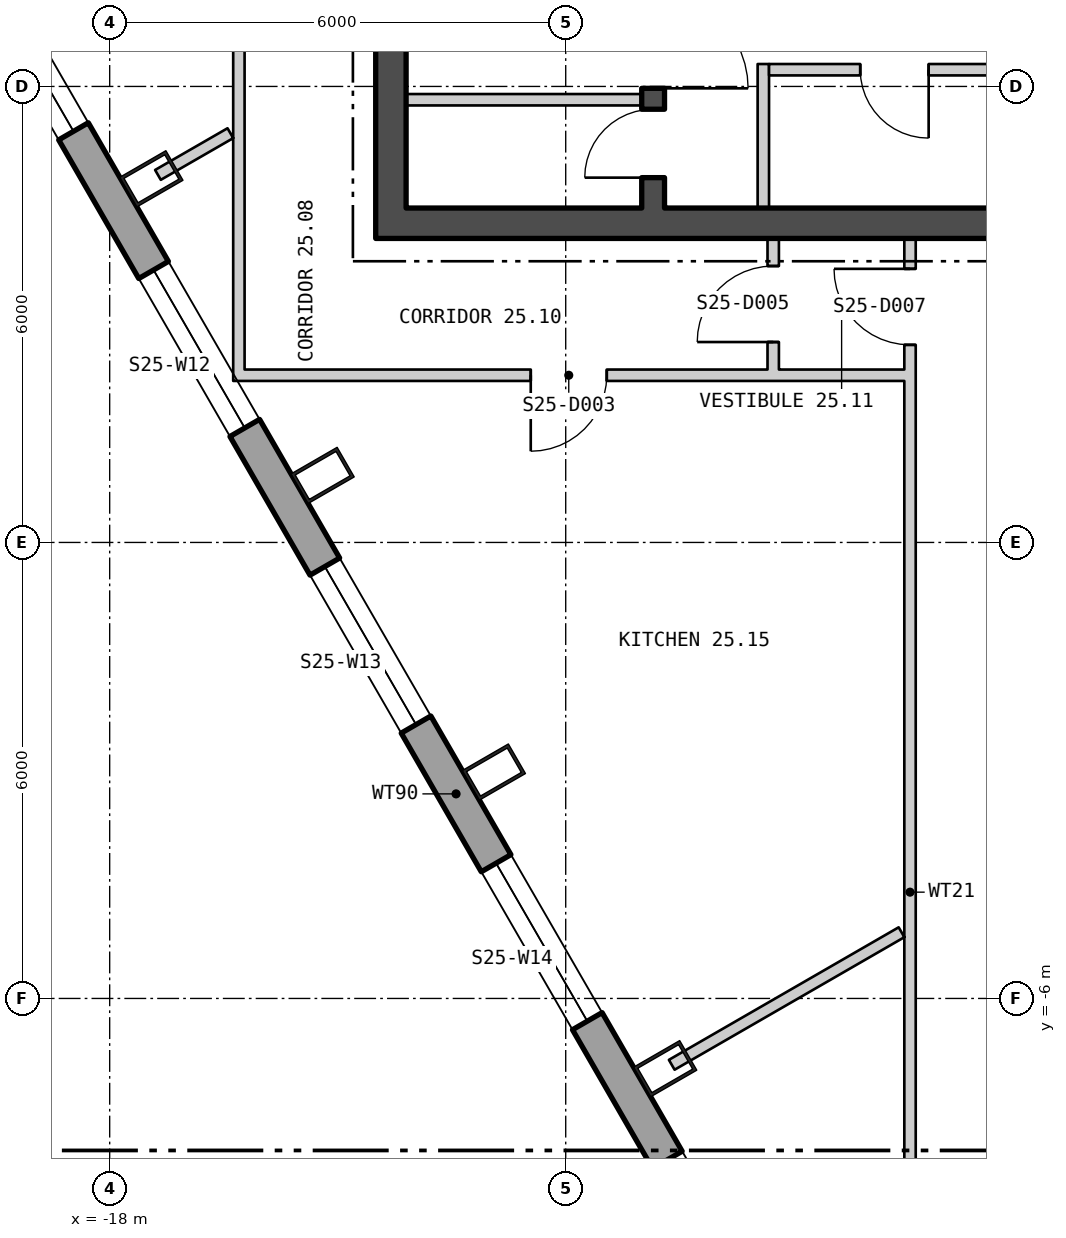
"""IFC4 building model, lengths in metres.
Left out: names, types, materials, properties, quantities, classifications, styles, units other than length and angle.
Written with IfcOpenShell. Run it as: python <this file> out.ifc"""

import sys

from ifc_helpers import new_model, si_unit, direction, frame, frame_2d, origin, origin_2d, place, context, subcontext, project, spatial, polyline, rectangle, hollow_rectangle, outline, extrude, element, fill, save


model = new_model("IFC4")
c1 = context("Model", 3, precision=1e-05, world=origin(), true_north=direction((0.0, 1.0)))
c2 = subcontext(c1, "Body", "Model", "MODEL_VIEW")
j1 = project(units=[si_unit("LENGTHUNIT", "METRE"), si_unit("PLANEANGLEUNIT", "RADIAN")], contexts=[c1])
p1 = place(None, origin())
s1 = spatial("IfcSite", under=j1, at=p1, CompositionType="ELEMENT")
p2 = place(p1, origin())
s2 = spatial("IfcBuilding", under=s1, at=p2, CompositionType="ELEMENT")
p3 = place(p2, frame((0.0, 0.0, 321.0)))
s3 = spatial("IfcBuildingStorey", under=s2, at=p3, CompositionType="ELEMENT", Elevation=321.0)
for number, where, z_axis, x_axis in (
    (1, (-17.451, 4.785, 0.0), (0.0, 0.0, 1.0), (0.5, -0.866, 0.0)),
    (2, (-15.198, 0.882, 0.0), (0.0, 0.0, 1.0), (0.5, -0.866, 0.0)),
    (3, (-12.945, -3.021, 0.0), (0.0, 0.0, 1.0), (0.5, -0.866, 0.0)),
    (4, (-10.691, -6.924, 0.0), (0.0, 0.0, 1.0), (0.5, -0.866, 0.0)),
):
    element("IfcColumn", number, at=place(p3, frame(where, z_axis=z_axis, x_axis=x_axis)), inside=s3, PredefinedType="COLUMN", context=c2, shape_type="SweptSolid", body=[
        extrude(hollow_rectangle(XDim=0.45, YDim=0.7, WallThickness=0.04, at=origin_2d()), origin(), (0.0, 0.0, 1.0), 4.2),
    ])
p4 = place(p3, frame((-24.875, 16.493, -0.18), z_axis=(0.0, 0.0, 1.0), x_axis=(0.500000141277, -0.866025322218, 0.0)))
e5 = element("IfcWall", 5, at=p4, inside=s3, PredefinedType="SOLIDWALL", context=c2, shape_type="SweptSolid", body=[
    extrude(outline(polyline([(-0.13, -0.225), (45.86, -0.225), (45.6, 0.225), (0.13, 0.225), (-0.13, -0.225)])), origin(), (0.0, 0.0, 1.0), 3.98),
])
p5 = place(p4, frame((1.424, 0.0, 1.08)))
e6 = element("IfcOpeningElement", 6, at=p5, cuts=e5, PredefinedType="OPENING", context=c2, shape_type="SweptSolid", body=[
    extrude(rectangle(XDim=2.4, YDim=2.3, at=frame_2d((1.2, 1.15))), frame((0.0, 0.235, 0.0), z_axis=(0.0, -1.0, 0.0), x_axis=(1.0, 0.0, 0.0)), (0.0, 0.0, 1.0), 0.47),
])
p6 = place(p4, frame((5.892, 0.0, 1.08)))
e7 = element("IfcOpeningElement", 7, at=p6, cuts=e5, PredefinedType="OPENING", context=c2, shape_type="SweptSolid", body=[
    extrude(rectangle(XDim=2.4, YDim=2.3, at=frame_2d((1.2, 1.15))), frame((0.0, 0.235, 0.0), z_axis=(0.0, -1.0, 0.0), x_axis=(1.0, 0.0, 0.0)), (0.0, 0.0, 1.0), 0.47),
])
p7 = place(p4, frame((10.399, 0.0, 1.08)))
e8 = element("IfcOpeningElement", 8, at=p7, cuts=e5, PredefinedType="OPENING", context=c2, shape_type="SweptSolid", body=[
    extrude(rectangle(XDim=2.4, YDim=2.3, at=frame_2d((1.2, 1.15))), frame((0.0, 0.235, 0.0), z_axis=(0.0, -1.0, 0.0), x_axis=(1.0, 0.0, 0.0)), (0.0, 0.0, 1.0), 0.47),
])
p8 = place(p4, frame((14.905, 0.0, 1.08)))
e9 = element("IfcOpeningElement", 9, at=p8, cuts=e5, PredefinedType="OPENING", context=c2, shape_type="SweptSolid", body=[
    extrude(rectangle(XDim=2.4, YDim=2.3, at=frame_2d((1.2, 1.15))), frame((0.0, 0.235, 0.0), z_axis=(0.0, -1.0, 0.0), x_axis=(1.0, 0.0, 0.0)), (0.0, 0.0, 1.0), 0.47),
])
p9 = place(p4, frame((19.412, 0.0, 1.08)))
e10 = element("IfcOpeningElement", 10, at=p9, cuts=e5, PredefinedType="OPENING", context=c2, shape_type="SweptSolid", body=[
    extrude(rectangle(XDim=2.4, YDim=2.3, at=frame_2d((1.2, 1.15))), frame((0.0, 0.235, 0.0), z_axis=(0.0, -1.0, 0.0), x_axis=(1.0, 0.0, 0.0)), (0.0, 0.0, 1.0), 0.47),
])
p10 = place(p4, frame((23.918, 0.0, 1.08)))
e11 = element("IfcOpeningElement", 11, at=p10, cuts=e5, PredefinedType="OPENING", context=c2, shape_type="SweptSolid", body=[
    extrude(rectangle(XDim=2.4, YDim=2.3, at=frame_2d((1.2, 1.15))), frame((0.0, 0.235, 0.0), z_axis=(0.0, -1.0, 0.0), x_axis=(1.0, 0.0, 0.0)), (0.0, 0.0, 1.0), 0.47),
])
p11 = place(p4, frame((28.425, 0.0, 1.08)))
e12 = element("IfcOpeningElement", 12, at=p11, cuts=e5, PredefinedType="OPENING", context=c2, shape_type="SweptSolid", body=[
    extrude(rectangle(XDim=2.4, YDim=2.3, at=frame_2d((1.2, 1.15))), frame((0.0, 0.235, 0.0), z_axis=(0.0, -1.0, 0.0), x_axis=(1.0, 0.0, 0.0)), (0.0, 0.0, 1.0), 0.47),
])
p12 = place(p4, frame((37.438, 0.0, 1.08)))
e13 = element("IfcOpeningElement", 13, at=p12, cuts=e5, PredefinedType="OPENING", context=c2, shape_type="SweptSolid", body=[
    extrude(rectangle(XDim=2.4, YDim=2.3, at=frame_2d((1.2, 1.15))), frame((0.0, 0.235, 0.0), z_axis=(0.0, -1.0, 0.0), x_axis=(1.0, 0.0, 0.0)), (0.0, 0.0, 1.0), 0.47),
])
p13 = place(p4, frame((41.907, 0.0, 1.08)))
e14 = element("IfcOpeningElement", 14, at=p13, cuts=e5, PredefinedType="OPENING", context=c2, shape_type="SweptSolid", body=[
    extrude(rectangle(XDim=2.4, YDim=2.3, at=frame_2d((1.2, 1.15))), frame((0.0, 0.235, 0.0), z_axis=(0.0, -1.0, 0.0), x_axis=(1.0, 0.0, 0.0)), (0.0, 0.0, 1.0), 0.47),
])
p14 = place(p3, frame((-14.5, 4.2, 0.0), z_axis=(0.0, 0.0, 1.0), x_axis=(1.0, 0.0, 0.0)))
e15 = element("IfcWall", 15, at=p14, inside=s3, PredefinedType="SHEAR", context=c2, shape_type="SweptSolid", body=[
    extrude(rectangle(XDim=29.0, YDim=0.4, at=frame_2d((14.5, 0.0))), origin(), (0.0, 0.0, 1.0), 4.0),
])
p15 = place(p14, frame((9.0, 0.0, 0.0)))
e16 = element("IfcOpeningElement", 16, at=p15, cuts=e15, PredefinedType="OPENING", context=c2, shape_type="SweptSolid", body=[
    extrude(rectangle(XDim=1.8, YDim=2.4, at=frame_2d((0.9, 1.2))), frame((0.0, 0.21, 0.0), z_axis=(0.0, -1.0, 0.0), x_axis=(1.0, 0.0, 0.0)), (0.0, 0.0, 1.0), 0.42),
])
p16 = place(p14, frame((19.0, 0.0, 0.0)))
e17 = element("IfcOpeningElement", 17, at=p16, cuts=e15, PredefinedType="OPENING", context=c2, shape_type="SweptSolid", body=[
    extrude(rectangle(XDim=1.8, YDim=2.4, at=frame_2d((0.9, 1.2))), frame((0.0, 0.21, 0.0), z_axis=(0.0, -1.0, 0.0), x_axis=(1.0, 0.0, 0.0)), (0.0, 0.0, 1.0), 0.42),
])
p17 = place(p3, frame((-14.3, 4.4, 0.0), z_axis=(0.0, 0.0, 1.0), x_axis=(0.0, 1.0, 0.0)))
e18 = element("IfcWall", 18, at=p17, inside=s3, PredefinedType="SHEAR", context=c2, shape_type="SweptSolid", body=[
    extrude(rectangle(XDim=13.2, YDim=0.4, at=frame_2d((6.6, 0.0))), origin(), (0.0, 0.0, 1.0), 4.0),
])
p18 = place(p17, frame((3.05, 0.0, 0.0)))
e19 = element("IfcOpeningElement", 19, at=p18, cuts=e18, PredefinedType="OPENING", context=c2, shape_type="SweptSolid", body=[
    extrude(rectangle(XDim=1.5, YDim=2.1, at=frame_2d((0.75, 1.05))), frame((0.0, 0.21, 0.0), z_axis=(0.0, -1.0, 0.0), x_axis=(1.0, 0.0, 0.0)), (0.0, 0.0, 1.0), 0.42),
])
p19 = place(p3, frame((-10.85, 4.4, 0.0), z_axis=(0.0, 0.0, 1.0), x_axis=(0.0, 1.0, 0.0)))
e20 = element("IfcWall", 20, at=p19, inside=s3, PredefinedType="SHEAR", context=c2, shape_type="SweptSolid", body=[
    extrude(rectangle(XDim=13.2, YDim=0.3, at=frame_2d((6.6, 0.0))), origin(), (0.0, 0.0, 1.0), 4.0),
])
p20 = place(p19, frame((1.575, 0.0, 0.0)))
e21 = element("IfcOpeningElement", 21, at=p20, cuts=e20, PredefinedType="OPENING", context=c2, shape_type="SweptSolid", body=[
    extrude(rectangle(XDim=1.25, YDim=2.1, at=frame_2d((0.625, 1.05))), frame((0.0, 0.16, 0.0), z_axis=(0.0, -1.0, 0.0), x_axis=(1.0, 0.0, 0.0)), (0.0, 0.0, 1.0), 0.32),
])
p21 = place(p19, frame((0.4, 0.0, 0.0)))
e22 = element("IfcOpeningElement", 22, at=p21, cuts=e20, PredefinedType="OPENING", context=c2, shape_type="SweptSolid", body=[
    extrude(rectangle(XDim=0.9, YDim=2.1, at=frame_2d((0.45, 1.05))), frame((0.0, 0.16, 0.0), z_axis=(0.0, -1.0, 0.0), x_axis=(1.0, 0.0, 0.0)), (0.0, 0.0, 1.0), 0.32),
])
p22 = place(p3, frame((-14.1, 5.825, 0.0), z_axis=(0.0, 0.0, 1.0), x_axis=(1.0, 0.0, 0.0)))
e23 = element("IfcWall", 23, at=p22, inside=s3, PredefinedType="PARTITIONING", context=c2, shape_type="SweptSolid", body=[
    extrude(rectangle(XDim=3.1, YDim=0.15, at=frame_2d((1.55, 0.0))), origin(), (0.0, 0.0, 1.0), 4.0),
])
p23 = place(p3, frame((-9.4, 4.4, 0.0), z_axis=(0.0, 0.0, 1.0), x_axis=(0.0, 1.0, 0.0)))
e24 = element("IfcWall", 24, at=p23, inside=s3, PredefinedType="PARTITIONING", context=c2, shape_type="SweptSolid", body=[
    extrude(rectangle(XDim=1.895, YDim=0.15, at=frame_2d((0.948, 0.0))), origin(), (0.0, 0.0, 1.0), 4.0),
])
p24 = place(p3, frame((-9.325, 6.22, 0.0), z_axis=(0.0, 0.0, 1.0), x_axis=(1.0, 0.0, 0.0)))
e25 = element("IfcWall", 25, at=p24, inside=s3, PredefinedType="PARTITIONING", context=c2, shape_type="SweptSolid", body=[
    extrude(rectangle(XDim=3.3, YDim=0.15, at=frame_2d((1.65, 0.0))), origin(), (0.0, 0.0, 1.0), 4.0),
])
p25 = place(p24, frame((1.2, 0.0, 0.0)))
e26 = element("IfcOpeningElement", 26, at=p25, cuts=e25, PredefinedType="OPENING", context=c2, shape_type="SweptSolid", body=[
    extrude(rectangle(XDim=0.9, YDim=2.1, at=frame_2d((0.45, 1.05))), frame((0.0, 0.085, 0.0), z_axis=(0.0, -1.0, 0.0), x_axis=(1.0, 0.0, 0.0)), (0.0, 0.0, 1.0), 0.17),
])
p26 = place(p3, frame((-17.365, 4.836, 0.0), z_axis=(0.0, 0.0, 1.0), x_axis=(0.86650329071, 0.499171360545, 0.0)))
e27 = element("IfcWall", 27, at=p26, inside=s3, PredefinedType="PARTITIONING", context=c2, shape_type="SweptSolid", body=[
    extrude(rectangle(XDim=1.1, YDim=0.15, at=frame_2d((0.55, 0.0))), origin(), (0.0, 0.0, 1.0), 4.0),
])
p27 = place(p3, frame((-16.3, 2.125, 0.0), z_axis=(0.0, 0.0, 1.0), x_axis=(0.0, 1.0, 0.0)))
e28 = element("IfcWall", 28, at=p27, inside=s3, PredefinedType="PARTITIONING", context=c2, shape_type="SweptSolid", body=[
    extrude(rectangle(XDim=15.399, YDim=0.15, at=frame_2d((7.699, 0.0))), origin(), (0.0, 0.0, 1.0), 4.0),
])
p28 = place(p27, frame((6.88, 0.0, 0.0)))
e29 = element("IfcOpeningElement", 29, at=p28, cuts=e28, PredefinedType="OPENING", context=c2, shape_type="SweptSolid", body=[
    extrude(rectangle(XDim=1.0, YDim=2.1, at=frame_2d((0.5, 1.05))), frame((0.0, 0.085, 0.0), z_axis=(0.0, -1.0, 0.0), x_axis=(1.0, 0.0, 0.0)), (0.0, 0.0, 1.0), 0.17),
])
p29 = place(p27, frame((13.069, 0.0, 0.0)))
e30 = element("IfcOpeningElement", 30, at=p29, cuts=e28, PredefinedType="OPENING", context=c2, shape_type="SweptSolid", body=[
    extrude(rectangle(XDim=1.0, YDim=2.1, at=frame_2d((0.5, 1.05))), frame((0.0, 0.085, 0.0), z_axis=(0.0, -1.0, 0.0), x_axis=(1.0, 0.0, 0.0)), (0.0, 0.0, 1.0), 0.17),
])
p30 = place(p3, frame((-16.225, 2.2, 0.0), z_axis=(0.0, 0.0, 1.0), x_axis=(1.0, 0.0, 0.0)))
e31 = element("IfcWall", 31, at=p30, inside=s3, PredefinedType="PARTITIONING", context=c2, shape_type="SweptSolid", body=[
    extrude(rectangle(XDim=8.68, YDim=0.15, at=frame_2d((4.34, 0.0))), origin(), (0.0, 0.0, 1.0), 4.0),
])
p31 = place(p30, frame((3.765, 0.0, 0.0)))
e32 = element("IfcOpeningElement", 32, at=p31, cuts=e31, PredefinedType="OPENING", context=c2, shape_type="SweptSolid", body=[
    extrude(rectangle(XDim=1.0, YDim=2.1, at=frame_2d((0.5, 1.05))), frame((0.0, 0.085, 0.0), z_axis=(0.0, -1.0, 0.0), x_axis=(1.0, 0.0, 0.0)), (0.0, 0.0, 1.0), 0.17),
])
p32 = place(p3, frame((-10.605, -6.873, 0.0), z_axis=(0.0, 0.0, 1.0), x_axis=(0.866190356265, 0.499714185023, 0.0)))
e33 = element("IfcWall", 33, at=p32, inside=s3, PredefinedType="PARTITIONING", context=c2, shape_type="SweptSolid", body=[
    extrude(rectangle(XDim=3.49, YDim=0.15, at=frame_2d((1.745, 0.0))), origin(), (0.0, 0.0, 1.0), 4.0),
])
p33 = place(p3, frame((-9.27, 2.275, 0.0), z_axis=(0.0, 0.0, 1.0), x_axis=(0.0, 1.0, 0.0)))
e34 = element("IfcWall", 34, at=p33, inside=s3, PredefinedType="PARTITIONING", context=c2, shape_type="SweptSolid", body=[
    extrude(rectangle(XDim=1.725, YDim=0.15, at=frame_2d((0.863, 0.0))), origin(), (0.0, 0.0, 1.0), 4.0),
])
p34 = place(p33, frame((0.362, 0.0, 0.0)))
e35 = element("IfcOpeningElement", 35, at=p34, cuts=e34, PredefinedType="OPENING", context=c2, shape_type="SweptSolid", body=[
    extrude(rectangle(XDim=1.0, YDim=2.1, at=frame_2d((0.5, 1.05))), frame((0.0, 0.085, 0.0), z_axis=(0.0, -1.0, 0.0), x_axis=(1.0, 0.0, 0.0)), (0.0, 0.0, 1.0), 0.17),
])
p35 = place(p3, frame((-7.47, -13.203, 0.0), z_axis=(0.0, 0.0, 1.0), x_axis=(0.0, 1.0, 0.0)))
e36 = element("IfcWall", 36, at=p35, inside=s3, PredefinedType="PARTITIONING", context=c2, shape_type="SweptSolid", body=[
    extrude(rectangle(XDim=17.203, YDim=0.15, at=frame_2d((8.601, 0.0))), origin(), (0.0, 0.0, 1.0), 4.0),
])
p36 = place(p35, frame((3.519, 0.0, 0.0)))
e37 = element("IfcOpeningElement", 37, at=p36, cuts=e36, PredefinedType="OPENING", context=c2, shape_type="SweptSolid", body=[
    extrude(rectangle(XDim=1.0, YDim=2.1, at=frame_2d((0.5, 1.05))), frame((0.0, 0.085, 0.0), z_axis=(0.0, -1.0, 0.0), x_axis=(1.0, 0.0, 0.0)), (0.0, 0.0, 1.0), 0.17),
])
p37 = place(p35, frame((15.803, 0.0, 0.0)))
e38 = element("IfcOpeningElement", 38, at=p37, cuts=e36, PredefinedType="OPENING", context=c2, shape_type="SweptSolid", body=[
    extrude(rectangle(XDim=1.0, YDim=2.1, at=frame_2d((0.5, 1.05))), frame((0.0, 0.085, 0.0), z_axis=(0.0, -1.0, 0.0), x_axis=(1.0, 0.0, 0.0)), (0.0, 0.0, 1.0), 0.17),
])
p38 = place(p7, origin())
e39 = element("IfcWindow", 39, at=p38, inside=s3, PartitioningType="SINGLE_PANEL", PredefinedType="WINDOW", context=c2, shape_type="SweptSolid", body=[
    extrude(rectangle(XDim=2.4, YDim=2.3, at=frame_2d((1.2, 1.15))), frame((0.0, 0.105, 0.0), z_axis=(0.0, -1.0, 0.0), x_axis=(1.0, 0.0, 0.0)), (0.0, 0.0, 1.0), 0.06),
])
fill(e8, e39)
p39 = place(p8, origin())
e40 = element("IfcWindow", 40, at=p39, inside=s3, PartitioningType="SINGLE_PANEL", PredefinedType="WINDOW", context=c2, shape_type="SweptSolid", body=[
    extrude(rectangle(XDim=2.4, YDim=2.3, at=frame_2d((1.2, 1.15))), frame((0.0, 0.105, 0.0), z_axis=(0.0, -1.0, 0.0), x_axis=(1.0, 0.0, 0.0)), (0.0, 0.0, 1.0), 0.06),
])
fill(e9, e40)
p40 = place(p9, origin())
e41 = element("IfcWindow", 41, at=p40, inside=s3, PartitioningType="SINGLE_PANEL", PredefinedType="WINDOW", context=c2, shape_type="SweptSolid", body=[
    extrude(rectangle(XDim=2.4, YDim=2.3, at=frame_2d((1.2, 1.15))), frame((0.0, 0.105, 0.0), z_axis=(0.0, -1.0, 0.0), x_axis=(1.0, 0.0, 0.0)), (0.0, 0.0, 1.0), 0.06),
])
fill(e10, e41)
p41 = place(p10, origin())
e42 = element("IfcWindow", 42, at=p41, inside=s3, PartitioningType="SINGLE_PANEL", PredefinedType="WINDOW", context=c2, shape_type="SweptSolid", body=[
    extrude(rectangle(XDim=2.4, YDim=2.3, at=frame_2d((1.2, 1.15))), frame((0.0, 0.105, 0.0), z_axis=(0.0, -1.0, 0.0), x_axis=(1.0, 0.0, 0.0)), (0.0, 0.0, 1.0), 0.06),
])
fill(e11, e42)
p42 = place(p11, origin())
e43 = element("IfcWindow", 43, at=p42, inside=s3, PartitioningType="SINGLE_PANEL", PredefinedType="WINDOW", context=c2, shape_type="SweptSolid", body=[
    extrude(rectangle(XDim=2.4, YDim=2.3, at=frame_2d((1.2, 1.15))), frame((0.0, 0.105, 0.0), z_axis=(0.0, -1.0, 0.0), x_axis=(1.0, 0.0, 0.0)), (0.0, 0.0, 1.0), 0.06),
])
fill(e12, e43)
p43 = place(p20, origin())
e44 = element("IfcDoor", 44, at=p43, inside=s3, OperationType="SINGLE_SWING_LEFT", PredefinedType="DOOR", context=c2, shape_type="SweptSolid", body=[
    extrude(rectangle(XDim=1.25, YDim=2.1, at=frame_2d((0.625, 1.05))), frame((0.0, 0.025, 0.0), z_axis=(0.0, -1.0, 0.0), x_axis=(1.0, 0.0, 0.0)), (0.0, 0.0, 1.0), 0.05),
])
fill(e21, e44)
p44 = place(p21, origin())
e45 = element("IfcDoor", 45, at=p44, inside=s3, OperationType="SINGLE_SWING_RIGHT", PredefinedType="DOOR", context=c2, shape_type="SweptSolid", body=[
    extrude(rectangle(XDim=0.9, YDim=2.1, at=frame_2d((0.45, 1.05))), frame((0.0, 0.025, 0.0), z_axis=(0.0, -1.0, 0.0), x_axis=(1.0, 0.0, 0.0)), (0.0, 0.0, 1.0), 0.05),
])
fill(e22, e45)
p45 = place(p25, origin())
e46 = element("IfcDoor", 46, at=p45, inside=s3, OperationType="SINGLE_SWING_RIGHT", PredefinedType="DOOR", context=c2, shape_type="SweptSolid", body=[
    extrude(rectangle(XDim=0.9, YDim=2.1, at=frame_2d((0.45, 1.05))), frame((0.0, 0.025, 0.0), z_axis=(0.0, -1.0, 0.0), x_axis=(1.0, 0.0, 0.0)), (0.0, 0.0, 1.0), 0.05),
])
fill(e26, e46)
p46 = place(p31, origin())
e47 = element("IfcDoor", 47, at=p46, inside=s3, OperationType="SINGLE_SWING_LEFT", PredefinedType="DOOR", context=c2, shape_type="SweptSolid", body=[
    extrude(rectangle(XDim=1.0, YDim=2.1, at=frame_2d((0.5, 1.05))), frame((0.0, 0.025, 0.0), z_axis=(0.0, -1.0, 0.0), x_axis=(1.0, 0.0, 0.0)), (0.0, 0.0, 1.0), 0.05),
])
fill(e32, e47)
p47 = place(p34, origin())
e48 = element("IfcDoor", 48, at=p47, inside=s3, OperationType="SINGLE_SWING_RIGHT", PredefinedType="DOOR", context=c2, shape_type="SweptSolid", body=[
    extrude(rectangle(XDim=1.0, YDim=2.1, at=frame_2d((0.5, 1.05))), frame((0.0, 0.025, 0.0), z_axis=(0.0, -1.0, 0.0), x_axis=(1.0, 0.0, 0.0)), (0.0, 0.0, 1.0), 0.05),
])
fill(e35, e48)
p48 = place(p37, origin())
e49 = element("IfcDoor", 49, at=p48, inside=s3, OperationType="SINGLE_SWING_LEFT", PredefinedType="DOOR", context=c2, shape_type="SweptSolid", body=[
    extrude(rectangle(XDim=1.0, YDim=2.1, at=frame_2d((0.5, 1.05))), frame((0.0, 0.025, 0.0), z_axis=(0.0, -1.0, 0.0), x_axis=(1.0, 0.0, 0.0)), (0.0, 0.0, 1.0), 0.05),
])
fill(e38, e49)
save(model, sys.argv[1])
